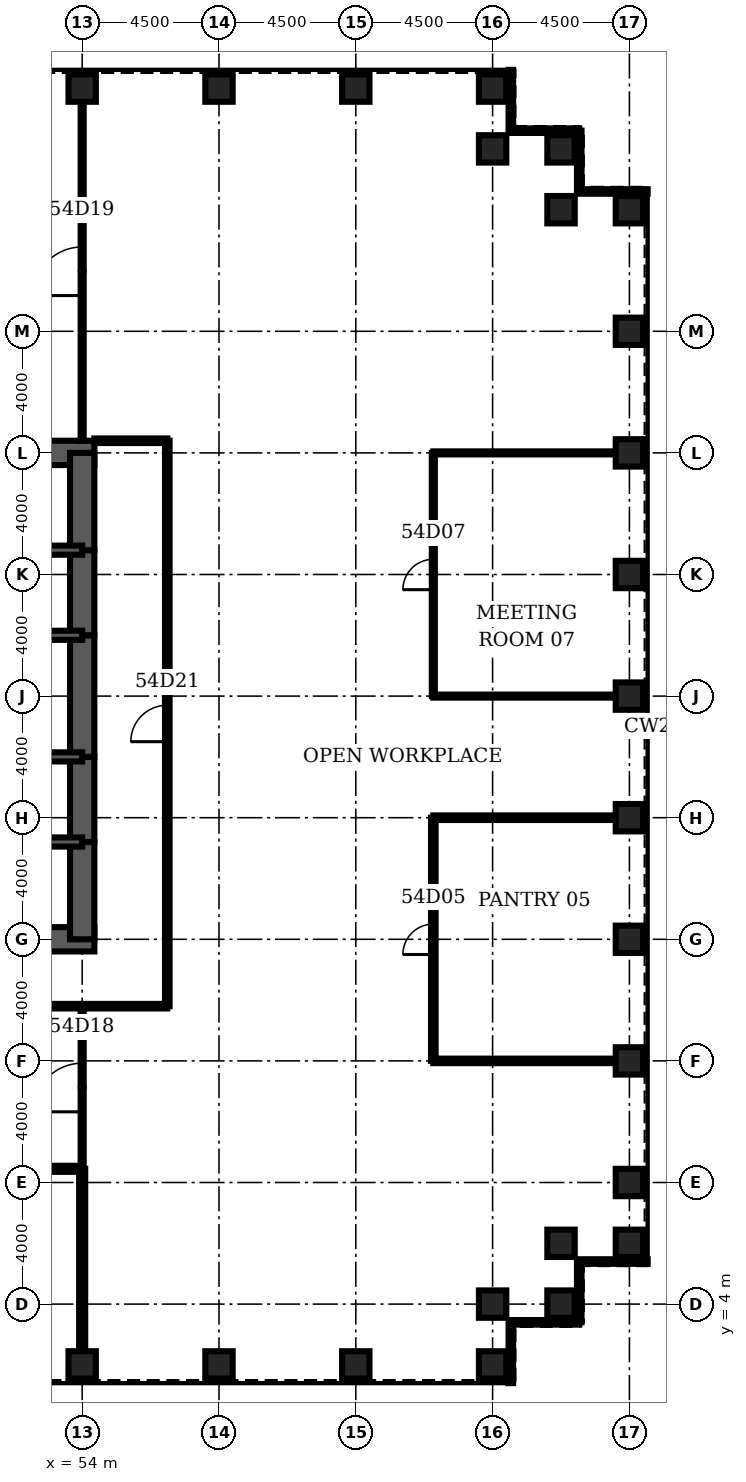
"""IFC4 building model, lengths in metres.
Left out: names, types, materials, properties, quantities, classifications, styles, units other than length and angle.
Written with IfcOpenShell. Run it as: python <this file> out.ifc"""

import sys

from ifc_helpers import new_model, si_unit, direction, frame, frame_2d, origin, origin_2d, place, context, subcontext, project, spatial, rectangle, hollow_rectangle, extrude, element, fill, save


model = new_model("IFC4")
c1 = context("Model", 3, precision=1e-05, world=origin(), true_north=direction((0.0, 1.0)))
c2 = subcontext(c1, "Body", "Model", "MODEL_VIEW")
j1 = project(units=[si_unit("LENGTHUNIT", "METRE"), si_unit("PLANEANGLEUNIT", "RADIAN")], contexts=[c1])
p1 = place(None, origin())
s1 = spatial("IfcSite", under=j1, at=p1, CompositionType="ELEMENT")
p2 = place(p1, origin())
s2 = spatial("IfcBuilding", under=s1, at=p2, CompositionType="ELEMENT")
p3 = place(p2, frame((0.0, 0.0, 240.4)))
s3 = spatial("IfcBuildingStorey", under=s2, at=p3, CompositionType="ELEMENT", Elevation=240.4)
for number, where, z_axis, x_axis in (
    (1, (54.0, 2.0, 0.0), (0.0, 0.0, 1.0), (0.0, 1.0, 0.0)),
    (2, (58.5, 2.0, 0.0), (0.0, 0.0, 1.0), (0.0, 1.0, 0.0)),
    (3, (63.0, 2.0, 0.0), (0.0, 0.0, 1.0), (0.0, 1.0, 0.0)),
    (4, (67.5, 2.0, 0.0), (0.0, 0.0, 1.0), (0.0, 1.0, 0.0)),
    (5, (67.5, 4.0, 0.0), (0.0, 0.0, 1.0), (0.0, 1.0, 0.0)),
    (6, (69.75, 4.0, 0.0), (0.0, 0.0, 1.0), (1.0, 0.0, 0.0)),
    (7, (69.75, 6.0, 0.0), (0.0, 0.0, 1.0), (1.0, 0.0, 0.0)),
    (8, (72.0, 6.0, 0.0), (0.0, 0.0, 1.0), (1.0, 0.0, 0.0)),
    (9, (72.0, 8.0, 0.0), (0.0, 0.0, 1.0), (1.0, 0.0, 0.0)),
    (10, (72.0, 12.0, 0.0), (0.0, 0.0, 1.0), (1.0, 0.0, 0.0)),
    (11, (72.0, 16.0, 0.0), (0.0, 0.0, 1.0), (1.0, 0.0, 0.0)),
    (12, (72.0, 20.0, 0.0), (0.0, 0.0, 1.0), (1.0, 0.0, 0.0)),
    (13, (72.0, 24.0, 0.0), (0.0, 0.0, 1.0), (1.0, 0.0, 0.0)),
    (14, (72.0, 28.0, 0.0), (0.0, 0.0, 1.0), (1.0, 0.0, 0.0)),
    (15, (72.0, 32.0, 0.0), (0.0, 0.0, 1.0), (1.0, 0.0, 0.0)),
    (16, (72.0, 36.0, 0.0), (0.0, 0.0, 1.0), (1.0, 0.0, 0.0)),
    (17, (72.0, 40.0, 0.0), (0.0, 0.0, 1.0), (1.0, 0.0, 0.0)),
    (18, (69.75, 40.0, 0.0), (0.0, 0.0, 1.0), (1.0, 0.0, 0.0)),
    (19, (69.75, 42.0, 0.0), (0.0, 0.0, 1.0), (1.0, 0.0, 0.0)),
    (20, (67.5, 42.0, 0.0), (0.0, 0.0, 1.0), (0.0, 1.0, 0.0)),
    (21, (67.5, 44.0, 0.0), (0.0, 0.0, 1.0), (0.0, 1.0, 0.0)),
    (22, (63.0, 44.0, 0.0), (0.0, 0.0, 1.0), (0.0, 1.0, 0.0)),
    (23, (58.5, 44.0, 0.0), (0.0, 0.0, 1.0), (0.0, 1.0, 0.0)),
    (24, (54.0, 44.0, 0.0), (0.0, 0.0, 1.0), (0.0, 1.0, 0.0)),
):
    element("IfcColumn", number, at=place(p3, frame(where, z_axis=z_axis, x_axis=x_axis)), inside=s3, PredefinedType="COLUMN", context=c2, shape_type="SweptSolid", body=[
        extrude(hollow_rectangle(XDim=0.9, YDim=0.9, WallThickness=0.08, at=origin_2d()), origin(), (0.0, 0.0, 1.0), 4.2),
    ])
for number, where, z_axis, x_axis in (
    (25, (45.0, 16.0, 0.0), (0.0, 0.0, 1.0), (1.0, 0.0, 0.0)),
    (26, (54.4, 32.0, 0.0), (0.0, 0.0, 1.0), (-1.0, 0.0, 0.0)),
):
    element("IfcWall", number, at=place(p3, frame(where, z_axis=z_axis, x_axis=x_axis)), inside=s3, PredefinedType="SHEAR", context=c2, shape_type="SweptSolid", body=[
        extrude(rectangle(XDim=9.4, YDim=0.8, at=frame_2d((4.7, 0.0))), origin(), (0.0, 0.0, 1.0), 4.2),
    ])
p4 = place(p3, frame((54.0, 16.0, 0.0), z_axis=(0.0, 0.0, 1.0), x_axis=(0.0, 1.0, 0.0)))
e27 = element("IfcWall", 27, at=p4, inside=s3, PredefinedType="SHEAR", context=c2, shape_type="SweptSolid", body=[
    extrude(rectangle(XDim=3.2, YDim=0.8, at=frame_2d((1.6, 0.0))), origin(), (0.0, 0.0, 1.0), 4.2),
])
p5 = place(p3, frame((54.0, 19.2, 0.0), z_axis=(0.0, 0.0, 1.0), x_axis=(0.0, 1.0, 0.0)))
e28 = element("IfcWall", 28, at=p5, inside=s3, PredefinedType="SHEAR", context=c2, shape_type="SweptSolid", body=[
    extrude(rectangle(XDim=2.8, YDim=0.8, at=frame_2d((1.4, 0.0))), origin(), (0.0, 0.0, 1.0), 4.2),
])
p6 = place(p5, frame((0.4, 0.0, 0.0)))
e29 = element("IfcOpeningElement", 29, at=p6, cuts=e28, PredefinedType="OPENING", context=c2, shape_type="SweptSolid", body=[
    extrude(rectangle(XDim=1.8, YDim=2.1, at=frame_2d((0.9, 1.05))), frame((0.0, 0.41, 0.0), z_axis=(0.0, -1.0, 0.0), x_axis=(1.0, 0.0, 0.0)), (0.0, 0.0, 1.0), 0.82),
])
p7 = place(p3, frame((54.0, 22.0, 0.0), z_axis=(0.0, 0.0, 1.0), x_axis=(0.0, 1.0, 0.0)))
e30 = element("IfcWall", 30, at=p7, inside=s3, PredefinedType="SHEAR", context=c2, shape_type="SweptSolid", body=[
    extrude(rectangle(XDim=4.0, YDim=0.8, at=frame_2d((2.0, 0.0))), origin(), (0.0, 0.0, 1.0), 4.2),
])
p8 = place(p3, frame((54.0, 26.0, 0.0), z_axis=(0.0, 0.0, 1.0), x_axis=(0.0, 1.0, 0.0)))
e31 = element("IfcWall", 31, at=p8, inside=s3, PredefinedType="SHEAR", context=c2, shape_type="SweptSolid", body=[
    extrude(rectangle(XDim=2.8, YDim=0.8, at=frame_2d((1.4, 0.0))), origin(), (0.0, 0.0, 1.0), 4.2),
])
p9 = place(p8, frame((0.6, 0.0, 0.0)))
e32 = element("IfcOpeningElement", 32, at=p9, cuts=e31, PredefinedType="OPENING", context=c2, shape_type="SweptSolid", body=[
    extrude(rectangle(XDim=1.8, YDim=2.1, at=frame_2d((0.9, 1.05))), frame((0.0, 0.41, 0.0), z_axis=(0.0, -1.0, 0.0), x_axis=(1.0, 0.0, 0.0)), (0.0, 0.0, 1.0), 0.82),
])
p10 = place(p3, frame((54.0, 28.8, 0.0), z_axis=(0.0, 0.0, 1.0), x_axis=(0.0, 1.0, 0.0)))
e33 = element("IfcWall", 33, at=p10, inside=s3, PredefinedType="SHEAR", context=c2, shape_type="SweptSolid", body=[
    extrude(rectangle(XDim=3.2, YDim=0.8, at=frame_2d((1.6, 0.0))), origin(), (0.0, 0.0, 1.0), 4.2),
])
p11 = place(p3, frame((45.0, 19.2, 0.0), z_axis=(0.0, 0.0, 1.0), x_axis=(1.0, 0.0, 0.0)))
e34 = element("IfcWall", 34, at=p11, inside=s3, PredefinedType="SOLIDWALL", context=c2, shape_type="SweptSolid", body=[
    extrude(rectangle(XDim=9.0, YDim=0.3, at=frame_2d((4.5, 0.0))), origin(), (0.0, 0.0, 1.0), 4.2),
])
p12 = place(p11, frame((7.35, 0.0, 0.0)))
e35 = element("IfcOpeningElement", 35, at=p12, cuts=e34, PredefinedType="OPENING", context=c2, shape_type="SweptSolid", body=[
    extrude(rectangle(XDim=1.0, YDim=2.1, at=frame_2d((0.5, 1.05))), frame((0.0, 0.16, 0.0), z_axis=(0.0, -1.0, 0.0), x_axis=(1.0, 0.0, 0.0)), (0.0, 0.0, 1.0), 0.32),
])
p13 = place(p3, frame((45.0, 28.8, 0.0), z_axis=(0.0, 0.0, 1.0), x_axis=(1.0, 0.0, 0.0)))
e36 = element("IfcWall", 36, at=p13, inside=s3, PredefinedType="SOLIDWALL", context=c2, shape_type="SweptSolid", body=[
    extrude(rectangle(XDim=9.0, YDim=0.3, at=frame_2d((4.5, 0.0))), origin(), (0.0, 0.0, 1.0), 4.2),
])
p14 = place(p13, frame((7.35, 0.0, 0.0)))
e37 = element("IfcOpeningElement", 37, at=p14, cuts=e36, PredefinedType="OPENING", context=c2, shape_type="SweptSolid", body=[
    extrude(rectangle(XDim=1.0, YDim=2.1, at=frame_2d((0.5, 1.05))), frame((0.0, 0.16, 0.0), z_axis=(0.0, -1.0, 0.0), x_axis=(1.0, 0.0, 0.0)), (0.0, 0.0, 1.0), 0.32),
])
p15 = place(p3, frame((48.0, 22.0, 0.0), z_axis=(0.0, 0.0, 1.0), x_axis=(1.0, 0.0, 0.0)))
e38 = element("IfcWall", 38, at=p15, inside=s3, PredefinedType="SOLIDWALL", context=c2, shape_type="SweptSolid", body=[
    extrude(rectangle(XDim=6.0, YDim=0.3, at=frame_2d((3.0, 0.0))), origin(), (0.0, 0.0, 1.0), 4.2),
])
p16 = place(p15, frame((2.0, 0.0, 0.0)))
e39 = element("IfcOpeningElement", 39, at=p16, cuts=e38, PredefinedType="OPENING", context=c2, shape_type="SweptSolid", body=[
    extrude(rectangle(XDim=1.0, YDim=2.1, at=frame_2d((0.5, 1.05))), frame((0.0, 0.16, 0.0), z_axis=(0.0, -1.0, 0.0), x_axis=(1.0, 0.0, 0.0)), (0.0, 0.0, 1.0), 0.32),
])
p17 = place(p15, frame((4.05, 0.0, 0.0)))
e40 = element("IfcOpeningElement", 40, at=p17, cuts=e38, PredefinedType="OPENING", context=c2, shape_type="SweptSolid", body=[
    extrude(rectangle(XDim=1.0, YDim=2.1, at=frame_2d((0.5, 1.05))), frame((0.0, 0.16, 0.0), z_axis=(0.0, -1.0, 0.0), x_axis=(1.0, 0.0, 0.0)), (0.0, 0.0, 1.0), 0.32),
])
p18 = place(p3, frame((48.0, 26.0, 0.0), z_axis=(0.0, 0.0, 1.0), x_axis=(1.0, 0.0, 0.0)))
e41 = element("IfcWall", 41, at=p18, inside=s3, PredefinedType="SOLIDWALL", context=c2, shape_type="SweptSolid", body=[
    extrude(rectangle(XDim=6.0, YDim=0.3, at=frame_2d((3.0, 0.0))), origin(), (0.0, 0.0, 1.0), 4.2),
])
p19 = place(p3, frame((36.0, 8.45, 0.0), z_axis=(0.0, 0.0, 1.0), x_axis=(1.0, 0.0, 0.0)))
e42 = element("IfcWall", 42, at=p19, inside=s3, PredefinedType="PARTITIONING", context=c2, shape_type="SweptSolid", body=[
    extrude(rectangle(XDim=18.0, YDim=0.2, at=frame_2d((9.0, 0.0))), origin(), (0.0, 0.0, 1.0), 3.0),
])
p20 = place(p19, frame((8.2, 0.0, 0.0)))
e43 = element("IfcOpeningElement", 43, at=p20, cuts=e42, PredefinedType="OPENING", context=c2, shape_type="SweptSolid", body=[
    extrude(rectangle(XDim=1.6, YDim=2.1, at=frame_2d((0.8, 1.05))), frame((0.0, 0.11, 0.0), z_axis=(0.0, -1.0, 0.0), x_axis=(1.0, 0.0, 0.0)), (0.0, 0.0, 1.0), 0.22),
])
p21 = place(p3, frame((65.55, 12.0, 0.0), z_axis=(0.0, 0.0, 1.0), x_axis=(1.0, 0.0, 0.0)))
e44 = element("IfcWall", 44, at=p21, inside=s3, PredefinedType="PARTITIONING", context=c2, shape_type="SweptSolid", body=[
    extrude(rectangle(XDim=6.0, YDim=0.15, at=frame_2d((3.0, 0.0))), origin(), (0.0, 0.0, 1.0), 3.0),
])
p22 = place(p3, frame((27.0, 13.8, 0.0), z_axis=(0.0, 0.0, 1.0), x_axis=(1.0, 0.0, 0.0)))
e45 = element("IfcWall", 45, at=p22, inside=s3, PredefinedType="PARTITIONING", context=c2, shape_type="SweptSolid", body=[
    extrude(rectangle(XDim=29.8, YDim=0.15, at=frame_2d((14.9, 0.0))), origin(), (0.0, 0.0, 1.0), 3.0),
])
p23 = place(p22, frame((15.925, 0.0, 0.0)))
e46 = element("IfcOpeningElement", 46, at=p23, cuts=e45, PredefinedType="OPENING", context=c2, shape_type="SweptSolid", body=[
    extrude(rectangle(XDim=1.2, YDim=2.1, at=frame_2d((0.6, 1.05))), frame((0.0, 0.085, 0.0), z_axis=(0.0, -1.0, 0.0), x_axis=(1.0, 0.0, 0.0)), (0.0, 0.0, 1.0), 0.17),
])
p24 = place(p3, frame((65.55, 20.0, 0.0), z_axis=(0.0, 0.0, 1.0), x_axis=(1.0, 0.0, 0.0)))
e47 = element("IfcWall", 47, at=p24, inside=s3, PredefinedType="PARTITIONING", context=c2, shape_type="SweptSolid", body=[
    extrude(rectangle(XDim=6.0, YDim=0.15, at=frame_2d((3.0, 0.0))), origin(), (0.0, 0.0, 1.0), 3.0),
])
for number, where, z_axis, x_axis in (
    (48, (65.55, 24.0, 0.0), (0.0, 0.0, 1.0), (1.0, 0.0, 0.0)),
    (49, (65.55, 32.0, 0.0), (0.0, 0.0, 1.0), (1.0, 0.0, 0.0)),
):
    element("IfcWall", number, at=place(p3, frame(where, z_axis=z_axis, x_axis=x_axis)), inside=s3, PredefinedType="PARTITIONING", context=c2, shape_type="SweptSolid", body=[
        extrude(rectangle(XDim=6.0, YDim=0.1, at=frame_2d((3.0, 0.0))), origin(), (0.0, 0.0, 1.0), 3.0),
    ])
p25 = place(p3, frame((54.4, 32.4, 0.0), z_axis=(0.0, 0.0, 1.0), x_axis=(1.0, 0.0, 0.0)))
e50 = element("IfcWall", 50, at=p25, inside=s3, PredefinedType="PARTITIONING", context=c2, shape_type="SweptSolid", body=[
    extrude(rectangle(XDim=2.4, YDim=0.15, at=frame_2d((1.2, 0.0))), origin(), (0.0, 0.0, 1.0), 3.0),
])
p26 = place(p3, frame((54.0, 2.45, 0.0), z_axis=(0.0, 0.0, 1.0), x_axis=(0.0, 1.0, 0.0)))
e51 = element("IfcWall", 51, at=p26, inside=s3, PredefinedType="PARTITIONING", context=c2, shape_type="SweptSolid", body=[
    extrude(rectangle(XDim=6.0, YDim=0.2, at=frame_2d((3.0, 0.0))), origin(), (0.0, 0.0, 1.0), 3.0),
])
p27 = place(p3, frame((54.0, 8.45, 0.0), z_axis=(0.0, 0.0, 1.0), x_axis=(0.0, 1.0, 0.0)))
e52 = element("IfcWall", 52, at=p27, inside=s3, PredefinedType="PARTITIONING", context=c2, shape_type="SweptSolid", body=[
    extrude(rectangle(XDim=5.35, YDim=0.1, at=frame_2d((2.675, 0.0))), origin(), (0.0, 0.0, 1.0), 3.0),
])
p28 = place(p27, frame((1.875, 0.0, 0.0)))
e53 = element("IfcOpeningElement", 53, at=p28, cuts=e52, PredefinedType="OPENING", context=c2, shape_type="SweptSolid", body=[
    extrude(rectangle(XDim=1.6, YDim=2.1, at=frame_2d((0.8, 1.05))), frame((0.0, 0.06, 0.0), z_axis=(0.0, -1.0, 0.0), x_axis=(1.0, 0.0, 0.0)), (0.0, 0.0, 1.0), 0.12),
])
p29 = place(p3, frame((54.0, 32.4, 0.0), z_axis=(0.0, 0.0, 1.0), x_axis=(0.0, 1.0, 0.0)))
e54 = element("IfcWall", 54, at=p29, inside=s3, PredefinedType="PARTITIONING", context=c2, shape_type="SweptSolid", body=[
    extrude(rectangle(XDim=11.15, YDim=0.1, at=frame_2d((5.575, 0.0))), origin(), (0.0, 0.0, 1.0), 3.0),
])
p30 = place(p29, frame((4.775, 0.0, 0.0)))
e55 = element("IfcOpeningElement", 55, at=p30, cuts=e54, PredefinedType="OPENING", context=c2, shape_type="SweptSolid", body=[
    extrude(rectangle(XDim=1.6, YDim=2.1, at=frame_2d((0.8, 1.05))), frame((0.0, 0.06, 0.0), z_axis=(0.0, -1.0, 0.0), x_axis=(1.0, 0.0, 0.0)), (0.0, 0.0, 1.0), 0.12),
])
p31 = place(p3, frame((56.8, 13.8, 0.0), z_axis=(0.0, 0.0, 1.0), x_axis=(0.0, 1.0, 0.0)))
e56 = element("IfcWall", 56, at=p31, inside=s3, PredefinedType="PARTITIONING", context=c2, shape_type="SweptSolid", body=[
    extrude(rectangle(XDim=18.6, YDim=0.15, at=frame_2d((9.3, 0.0))), origin(), (0.0, 0.0, 1.0), 3.0),
])
p32 = place(p31, frame((8.7, 0.0, 0.0)))
e57 = element("IfcOpeningElement", 57, at=p32, cuts=e56, PredefinedType="OPENING", context=c2, shape_type="SweptSolid", body=[
    extrude(rectangle(XDim=1.2, YDim=2.1, at=frame_2d((0.6, 1.05))), frame((0.0, 0.085, 0.0), z_axis=(0.0, -1.0, 0.0), x_axis=(1.0, 0.0, 0.0)), (0.0, 0.0, 1.0), 0.17),
])
p33 = place(p3, frame((65.55, 12.0, 0.0), z_axis=(0.0, 0.0, 1.0), x_axis=(0.0, 1.0, 0.0)))
e58 = element("IfcWall", 58, at=p33, inside=s3, PredefinedType="PARTITIONING", context=c2, shape_type="SweptSolid", body=[
    extrude(rectangle(XDim=8.0, YDim=0.15, at=frame_2d((4.0, 0.0))), origin(), (0.0, 0.0, 1.0), 3.0),
])
p34 = place(p33, frame((3.5, 0.0, 0.0)))
e59 = element("IfcOpeningElement", 59, at=p34, cuts=e58, PredefinedType="OPENING", context=c2, shape_type="SweptSolid", body=[
    extrude(rectangle(XDim=1.0, YDim=2.1, at=frame_2d((0.5, 1.05))), frame((0.0, 0.085, 0.0), z_axis=(0.0, -1.0, 0.0), x_axis=(1.0, 0.0, 0.0)), (0.0, 0.0, 1.0), 0.17),
])
p35 = place(p3, frame((65.55, 24.0, 0.0), z_axis=(0.0, 0.0, 1.0), x_axis=(0.0, 1.0, 0.0)))
e60 = element("IfcWall", 60, at=p35, inside=s3, PredefinedType="PARTITIONING", context=c2, shape_type="SweptSolid", body=[
    extrude(rectangle(XDim=8.0, YDim=0.1, at=frame_2d((4.0, 0.0))), origin(), (0.0, 0.0, 1.0), 3.0),
])
p36 = place(p35, frame((3.5, 0.0, 0.0)))
e61 = element("IfcOpeningElement", 61, at=p36, cuts=e60, PredefinedType="OPENING", context=c2, shape_type="SweptSolid", body=[
    extrude(rectangle(XDim=1.0, YDim=2.1, at=frame_2d((0.5, 1.05))), frame((0.0, 0.06, 0.0), z_axis=(0.0, -1.0, 0.0), x_axis=(1.0, 0.0, 0.0)), (0.0, 0.0, 1.0), 0.12),
])
p37 = place(p3, frame((68.1, 1.4, 0.0), z_axis=(0.0, 0.0, 1.0), x_axis=(0.0, 1.0, 0.0)))
e62 = element("IfcWall", 62, at=p37, inside=s3, PredefinedType="ELEMENTEDWALL", context=c2, shape_type="SweptSolid", body=[
    extrude(rectangle(XDim=2.0, YDim=0.15, at=frame_2d((1.0, 0.0))), origin(), (0.0, 0.0, 1.0), 4.04),
])
p38 = place(p3, frame((68.1, 3.4, 0.0), z_axis=(0.0, 0.0, 1.0), x_axis=(1.0, 0.0, 0.0)))
e63 = element("IfcWall", 63, at=p38, inside=s3, PredefinedType="ELEMENTEDWALL", context=c2, shape_type="SweptSolid", body=[
    extrude(rectangle(XDim=2.25, YDim=0.15, at=frame_2d((1.125, 0.0))), origin(), (0.0, 0.0, 1.0), 4.04),
])
p39 = place(p3, frame((70.35, 3.4, 0.0), z_axis=(0.0, 0.0, 1.0), x_axis=(0.0, 1.0, 0.0)))
e64 = element("IfcWall", 64, at=p39, inside=s3, PredefinedType="ELEMENTEDWALL", context=c2, shape_type="SweptSolid", body=[
    extrude(rectangle(XDim=2.0, YDim=0.15, at=frame_2d((1.0, 0.0))), origin(), (0.0, 0.0, 1.0), 4.04),
])
for number, where, z_axis, x_axis in (
    (65, (70.35, 5.4, 0.0), (0.0, 0.0, 1.0), (1.0, 0.0, 0.0)),
    (66, (72.6, 40.6, 0.0), (0.0, 0.0, 1.0), (-1.0, 0.0, 0.0)),
):
    element("IfcWall", number, at=place(p3, frame(where, z_axis=z_axis, x_axis=x_axis)), inside=s3, PredefinedType="ELEMENTEDWALL", context=c2, shape_type="SweptSolid", body=[
        extrude(rectangle(XDim=2.25, YDim=0.15, at=frame_2d((1.125, 0.0))), origin(), (0.0, 0.0, 1.0), 4.04),
    ])
p40 = place(p3, frame((70.35, 40.6, 0.0), z_axis=(0.0, 0.0, 1.0), x_axis=(0.0, 1.0, 0.0)))
e67 = element("IfcWall", 67, at=p40, inside=s3, PredefinedType="ELEMENTEDWALL", context=c2, shape_type="SweptSolid", body=[
    extrude(rectangle(XDim=2.0, YDim=0.15, at=frame_2d((1.0, 0.0))), origin(), (0.0, 0.0, 1.0), 4.04),
])
p41 = place(p3, frame((70.35, 42.6, 0.0), z_axis=(0.0, 0.0, 1.0), x_axis=(-1.0, 0.0, 0.0)))
e68 = element("IfcWall", 68, at=p41, inside=s3, PredefinedType="ELEMENTEDWALL", context=c2, shape_type="SweptSolid", body=[
    extrude(rectangle(XDim=2.25, YDim=0.15, at=frame_2d((1.125, 0.0))), origin(), (0.0, 0.0, 1.0), 4.04),
])
p42 = place(p3, frame((68.1, 42.6, 0.0), z_axis=(0.0, 0.0, 1.0), x_axis=(0.0, 1.0, 0.0)))
e69 = element("IfcWall", 69, at=p42, inside=s3, PredefinedType="ELEMENTEDWALL", context=c2, shape_type="SweptSolid", body=[
    extrude(rectangle(XDim=2.0, YDim=0.15, at=frame_2d((1.0, 0.0))), origin(), (0.0, 0.0, 1.0), 4.04),
])
p43 = place(p34, origin())
e70 = element("IfcDoor", 70, at=p43, inside=s3, OperationType="SINGLE_SWING_LEFT", PredefinedType="DOOR", context=c2, shape_type="SweptSolid", body=[
    extrude(rectangle(XDim=1.0, YDim=2.1, at=frame_2d((0.5, 1.05))), frame((0.0, 0.025, 0.0), z_axis=(0.0, -1.0, 0.0), x_axis=(1.0, 0.0, 0.0)), (0.0, 0.0, 1.0), 0.05),
])
fill(e59, e70)
p44 = place(p36, origin())
e71 = element("IfcDoor", 71, at=p44, inside=s3, OperationType="SINGLE_SWING_LEFT", PredefinedType="DOOR", context=c2, shape_type="SweptSolid", body=[
    extrude(rectangle(XDim=1.0, YDim=2.1, at=frame_2d((0.5, 1.05))), frame((0.0, 0.025, 0.0), z_axis=(0.0, -1.0, 0.0), x_axis=(1.0, 0.0, 0.0)), (0.0, 0.0, 1.0), 0.05),
])
fill(e61, e71)
p45 = place(p28, origin())
e72 = element("IfcDoor", 72, at=p45, inside=s3, OperationType="SINGLE_SWING_LEFT", PredefinedType="DOOR", context=c2, shape_type="SweptSolid", body=[
    extrude(rectangle(XDim=1.6, YDim=2.1, at=frame_2d((0.8, 1.05))), frame((0.0, 0.025, 0.0), z_axis=(0.0, -1.0, 0.0), x_axis=(1.0, 0.0, 0.0)), (0.0, 0.0, 1.0), 0.05),
])
fill(e53, e72)
p46 = place(p30, origin())
e73 = element("IfcDoor", 73, at=p46, inside=s3, OperationType="SINGLE_SWING_LEFT", PredefinedType="DOOR", context=c2, shape_type="SweptSolid", body=[
    extrude(rectangle(XDim=1.6, YDim=2.1, at=frame_2d((0.8, 1.05))), frame((0.0, 0.025, 0.0), z_axis=(0.0, -1.0, 0.0), x_axis=(1.0, 0.0, 0.0)), (0.0, 0.0, 1.0), 0.05),
])
fill(e55, e73)
p47 = place(p32, origin())
e74 = element("IfcDoor", 74, at=p47, inside=s3, OperationType="SINGLE_SWING_LEFT", PredefinedType="DOOR", context=c2, shape_type="SweptSolid", body=[
    extrude(rectangle(XDim=1.2, YDim=2.1, at=frame_2d((0.6, 1.05))), frame((0.0, 0.025, 0.0), z_axis=(0.0, -1.0, 0.0), x_axis=(1.0, 0.0, 0.0)), (0.0, 0.0, 1.0), 0.05),
])
fill(e57, e74)
p48 = place(p12, origin())
e75 = element("IfcDoor", 75, at=p48, inside=s3, OperationType="SINGLE_SWING_RIGHT", PredefinedType="DOOR", context=c2, shape_type="SweptSolid", body=[
    extrude(rectangle(XDim=1.0, YDim=2.1, at=frame_2d((0.5, 1.05))), frame((0.0, 0.025, 0.0), z_axis=(0.0, -1.0, 0.0), x_axis=(1.0, 0.0, 0.0)), (0.0, 0.0, 1.0), 0.05),
])
fill(e35, e75)
p49 = place(p14, origin())
e76 = element("IfcDoor", 76, at=p49, inside=s3, OperationType="SINGLE_SWING_RIGHT", PredefinedType="DOOR", context=c2, shape_type="SweptSolid", body=[
    extrude(rectangle(XDim=1.0, YDim=2.1, at=frame_2d((0.5, 1.05))), frame((0.0, 0.025, 0.0), z_axis=(0.0, -1.0, 0.0), x_axis=(1.0, 0.0, 0.0)), (0.0, 0.0, 1.0), 0.05),
])
fill(e37, e76)
p50 = place(p6, origin())
e77 = element("IfcDoor", 77, at=p50, inside=s3, OperationType="SINGLE_SWING_LEFT", PredefinedType="DOOR", context=c2, shape_type="SweptSolid", body=[
    extrude(rectangle(XDim=1.8, YDim=2.1, at=frame_2d((0.9, 1.05))), frame((0.0, 0.4, 0.0), z_axis=(0.0, -1.0, 0.0), x_axis=(1.0, 0.0, 0.0)), (0.0, 0.0, 1.0), 0.8),
])
fill(e29, e77)
p51 = place(p9, origin())
e78 = element("IfcDoor", 78, at=p51, inside=s3, OperationType="SINGLE_SWING_LEFT", PredefinedType="DOOR", context=c2, shape_type="SweptSolid", body=[
    extrude(rectangle(XDim=1.8, YDim=2.1, at=frame_2d((0.9, 1.05))), frame((0.0, 0.4, 0.0), z_axis=(0.0, -1.0, 0.0), x_axis=(1.0, 0.0, 0.0)), (0.0, 0.0, 1.0), 0.8),
])
fill(e32, e78)
p52 = place(p17, origin())
e79 = element("IfcDoor", 79, at=p52, inside=s3, OperationType="SINGLE_SWING_RIGHT", PredefinedType="DOOR", context=c2, shape_type="SweptSolid", body=[
    extrude(rectangle(XDim=1.0, YDim=2.1, at=frame_2d((0.5, 1.05))), frame((0.0, 0.025, 0.0), z_axis=(0.0, -1.0, 0.0), x_axis=(1.0, 0.0, 0.0)), (0.0, 0.0, 1.0), 0.05),
])
fill(e40, e79)
save(model, sys.argv[1])
